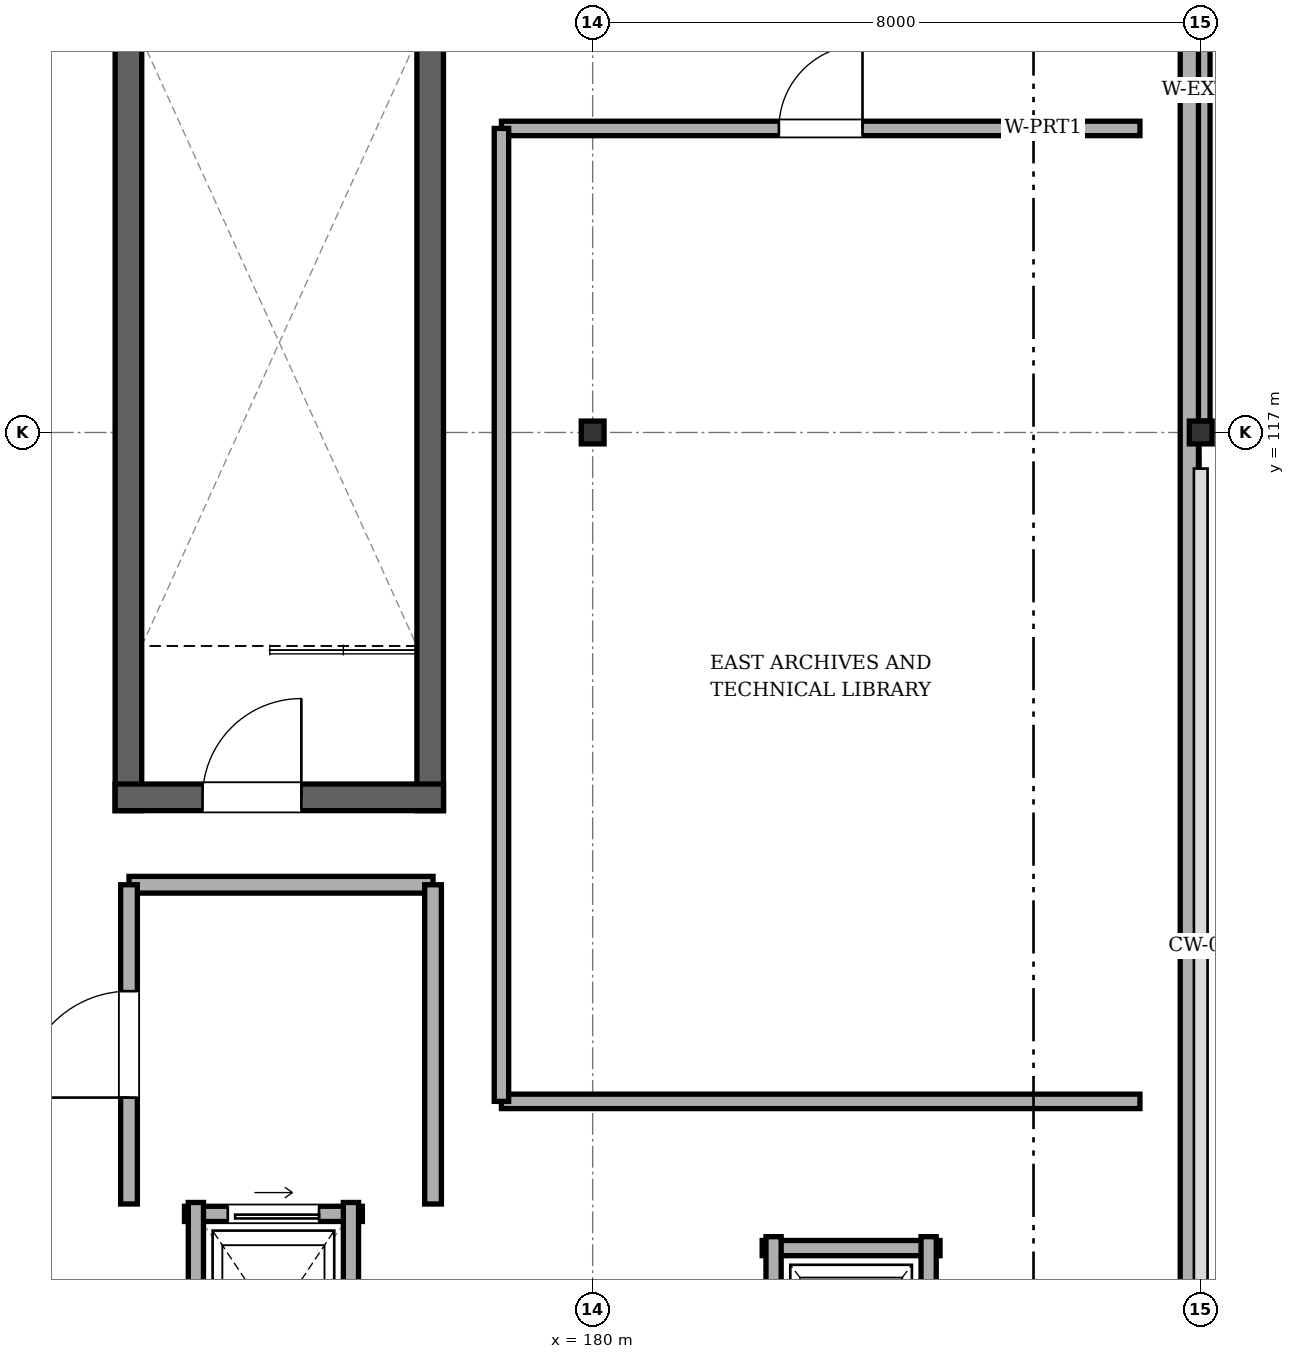
"""IFC4 building model, lengths in metres.
Left out: names, types, materials, properties, quantities, classifications, styles, units other than length and angle.
Written with IfcOpenShell. Run it as: python <this file> out.ifc"""

import sys

from ifc_helpers import new_model, si_unit, direction, frame, frame_2d, origin, origin_2d, place, context, subcontext, project, spatial, rectangle, i_section, extrude, element, fill, save


model = new_model("IFC4")
c1 = context("Model", 3, precision=1e-05, world=origin(), true_north=direction((0.0, 1.0)))
c2 = subcontext(c1, "Body", "Model", "MODEL_VIEW")
j1 = project(units=[si_unit("LENGTHUNIT", "METRE"), si_unit("PLANEANGLEUNIT", "RADIAN")], contexts=[c1])
p1 = place(None, origin())
s1 = spatial("IfcSite", under=j1, at=p1, CompositionType="ELEMENT")
p2 = place(p1, origin())
s2 = spatial("IfcBuilding", under=s1, at=p2, CompositionType="ELEMENT")
p3 = place(p2, frame((0.0, 0.0, 20.8)))
s3 = spatial("IfcBuildingStorey", under=s2, at=p3, CompositionType="ELEMENT", Elevation=20.8)
for number, where, z_axis, x_axis in (
    (1, (180.0, 117.0, 0.0), (0.0, 0.0, 1.0), (1.0, 0.0, 0.0)),
    (2, (188.0, 117.0, 0.0), (0.0, 0.0, 1.0), (1.0, 0.0, 0.0)),
):
    element("IfcColumn", number, at=place(p3, frame(where, z_axis=z_axis, x_axis=x_axis)), inside=s3, PredefinedType="COLUMN", context=c2, shape_type="SweptSolid", body=[
        extrude(i_section(OverallWidth=0.3, OverallDepth=0.3, WebThickness=0.01, FlangeThickness=0.015, FilletRadius=0.018, at=origin_2d()), origin(), (0.0, 0.0, 1.0), 2.85),
    ])
p4 = place(p3, frame((188.0, 125.85, 0.0), z_axis=(0.0, 0.0, 1.0), x_axis=(0.0, -1.0, 0.0)))
e3 = element("IfcWall", 3, at=p4, inside=s3, PredefinedType="SOLIDWALL", context=c2, shape_type="SweptSolid", body=[
    extrude(rectangle(XDim=8.7, YDim=0.245, at=frame_2d((4.35, 0.0))), origin(), (0.0, 0.0, 1.0), 2.18),
])
p5 = place(p3, frame((187.85, 76.65, 2.85), z_axis=(0.0, 0.0, 1.0), x_axis=(0.0, 1.0, 0.0)))
e4 = element("IfcWall", 4, at=p5, inside=s3, PredefinedType="PARAPET", context=c2, shape_type="SweptSolid", body=[
    extrude(rectangle(XDim=49.2, YDim=0.24, at=frame_2d((24.6, 0.0))), origin(), (0.0, 0.0, 1.0), 0.34),
])
for number, where, z_axis, x_axis in (
    (5, (177.863, 112.025, 0.0), (0.0, 0.0, 1.0), (0.0, 1.0, 0.0)),
    (6, (173.893, 122.522, 0.0), (0.0, 0.0, 1.0), (0.0, -1.0, 0.0)),
):
    element("IfcWall", number, at=place(p3, frame(where, z_axis=z_axis, x_axis=x_axis)), inside=s3, PredefinedType="SHEAR", context=c2, shape_type="SweptSolid", body=[
        extrude(rectangle(XDim=10.498, YDim=0.35, at=frame_2d((5.249, 0.0))), origin(), (0.0, 0.0, 1.0), 2.645),
    ])
p6 = place(p3, frame((173.718, 112.2, 0.0), z_axis=(0.0, 0.0, 1.0), x_axis=(1.0, 0.0, 0.0)))
e7 = element("IfcWall", 7, at=p6, inside=s3, PredefinedType="SHEAR", context=c2, shape_type="SweptSolid", body=[
    extrude(rectangle(XDim=4.32, YDim=0.35, at=frame_2d((2.16, 0.0))), origin(), (0.0, 0.0, 1.0), 2.645),
])
p7 = place(p6, frame((1.15, 0.0, 0.0)))
e8 = element("IfcOpeningElement", 8, at=p7, cuts=e7, PredefinedType="OPENING", context=c2, shape_type="SweptSolid", body=[
    extrude(rectangle(XDim=1.3, YDim=2.1, at=frame_2d((0.65, 1.05))), frame((0.0, 0.185, 0.0), z_axis=(0.0, -1.0, 0.0), x_axis=(1.0, 0.0, 0.0)), (0.0, 0.0, 1.0), 0.37),
])
p8 = place(p3, frame((176.97, 106.72, 0.0), z_axis=(0.0, 0.0, 1.0), x_axis=(-1.0, 0.0, 0.0)))
e9 = element("IfcWall", 9, at=p8, inside=s3, PredefinedType="SOLIDWALL", context=c2, shape_type="SweptSolid", body=[
    extrude(rectangle(XDim=2.34, YDim=0.2, at=frame_2d((1.17, 0.0))), origin(), (0.0, 0.0, 1.0), 2.62),
])
p9 = place(p8, frame((0.57, 0.0, 0.0)))
e10 = element("IfcOpeningElement", 10, at=p9, cuts=e9, PredefinedType="OPENING", context=c2, shape_type="SweptSolid", body=[
    extrude(rectangle(XDim=1.2, YDim=2.15, at=frame_2d((0.6, 1.075))), frame((0.0, 0.11, 0.0), z_axis=(0.0, -1.0, 0.0), x_axis=(1.0, 0.0, 0.0)), (0.0, 0.0, 1.0), 0.22),
])
for number, where, z_axis, x_axis in (
    (11, (174.78, 106.87, 0.0), (0.0, 0.0, 1.0), (0.0, -1.0, 0.0)),
    (12, (176.82, 103.73, 0.0), (0.0, 0.0, 1.0), (0.0, 1.0, 0.0)),
):
    element("IfcWall", number, at=place(p3, frame(where, z_axis=z_axis, x_axis=x_axis)), inside=s3, PredefinedType="SOLIDWALL", context=c2, shape_type="SweptSolid", body=[
        extrude(rectangle(XDim=3.14, YDim=0.2, at=frame_2d((1.57, 0.0))), origin(), (0.0, 0.0, 1.0), 2.23),
    ])
p10 = place(p3, frame((184.57, 106.27, 0.0), z_axis=(0.0, 0.0, 1.0), x_axis=(-1.0, 0.0, 0.0)))
e13 = element("IfcWall", 13, at=p10, inside=s3, PredefinedType="SOLIDWALL", context=c2, shape_type="SweptSolid", body=[
    extrude(rectangle(XDim=2.34, YDim=0.2, at=frame_2d((1.17, 0.0))), origin(), (0.0, 0.0, 1.0), 2.62),
])
for number, where, z_axis, x_axis in (
    (14, (182.38, 106.42, 0.0), (0.0, 0.0, 1.0), (0.0, -1.0, 0.0)),
    (15, (184.42, 103.58, 0.0), (0.0, 0.0, 1.0), (0.0, 1.0, 0.0)),
):
    element("IfcWall", number, at=place(p3, frame(where, z_axis=z_axis, x_axis=x_axis)), inside=s3, PredefinedType="SOLIDWALL", context=c2, shape_type="SweptSolid", body=[
        extrude(rectangle(XDim=2.84, YDim=0.2, at=frame_2d((1.42, 0.0))), origin(), (0.0, 0.0, 1.0), 2.23),
    ])
p11 = place(p3, frame((187.2, 108.2, 0.0), z_axis=(0.0, 0.0, 1.0), x_axis=(-1.0, 0.0, 0.0)))
e16 = element("IfcWall", 16, at=p11, inside=s3, PredefinedType="PARTITIONING", context=c2, shape_type="SweptSolid", body=[
    extrude(rectangle(XDim=8.4, YDim=0.19, at=frame_2d((4.2, 0.0))), origin(), (0.0, 0.0, 1.0), 2.18),
])
p12 = place(p3, frame((178.8, 121.0, 0.0), z_axis=(0.0, 0.0, 1.0), x_axis=(1.0, 0.0, 0.0)))
e17 = element("IfcWall", 17, at=p12, inside=s3, PredefinedType="PARTITIONING", context=c2, shape_type="SweptSolid", body=[
    extrude(rectangle(XDim=8.4, YDim=0.19, at=frame_2d((4.2, 0.0))), origin(), (0.0, 0.0, 1.0), 2.23),
])
p13 = place(p12, frame((3.65, 0.0, 0.0)))
e18 = element("IfcOpeningElement", 18, at=p13, cuts=e17, PredefinedType="OPENING", context=c2, shape_type="SweptSolid", body=[
    extrude(rectangle(XDim=1.1, YDim=2.1, at=frame_2d((0.55, 1.05))), frame((0.0, 0.105, 0.0), z_axis=(0.0, -1.0, 0.0), x_axis=(1.0, 0.0, 0.0)), (0.0, 0.0, 1.0), 0.21),
])
p14 = place(p3, frame((178.8, 108.2, 0.0), z_axis=(0.0, 0.0, 1.0), x_axis=(0.0, 1.0, 0.0)))
e19 = element("IfcWall", 19, at=p14, inside=s3, PredefinedType="PARTITIONING", context=c2, shape_type="SweptSolid", body=[
    extrude(rectangle(XDim=12.8, YDim=0.19, at=frame_2d((6.4, 0.0))), origin(), (0.0, 0.0, 1.0), 2.23),
])
p15 = place(p3, frame((173.9, 111.05, 0.0), z_axis=(0.0, 0.0, 1.0), x_axis=(1.0, 0.0, 0.0)))
e20 = element("IfcWall", 20, at=p15, inside=s3, PredefinedType="SOLIDWALL", context=c2, shape_type="SweptSolid", body=[
    extrude(rectangle(XDim=4.0, YDim=0.22, at=frame_2d((2.0, 0.0))), origin(), (0.0, 0.0, 1.0), 2.62),
])
p16 = place(p3, frame((173.9, 106.85, 0.0), z_axis=(0.0, 0.0, 1.0), x_axis=(0.0, 1.0, 0.0)))
e21 = element("IfcWall", 21, at=p16, inside=s3, PredefinedType="SOLIDWALL", context=c2, shape_type="SweptSolid", body=[
    extrude(rectangle(XDim=4.2, YDim=0.22, at=frame_2d((2.1, 0.0))), origin(), (0.0, 0.0, 1.0), 2.62),
])
p17 = place(p16, frame((1.4, 0.0, 0.0)))
e22 = element("IfcOpeningElement", 22, at=p17, cuts=e21, PredefinedType="OPENING", context=c2, shape_type="SweptSolid", body=[
    extrude(rectangle(XDim=1.4, YDim=2.1, at=frame_2d((0.7, 1.05))), frame((0.0, 0.12, 0.0), z_axis=(0.0, -1.0, 0.0), x_axis=(1.0, 0.0, 0.0)), (0.0, 0.0, 1.0), 0.24),
])
p18 = place(p3, frame((177.9, 111.05, 0.0), z_axis=(0.0, 0.0, 1.0), x_axis=(0.0, -1.0, 0.0)))
e23 = element("IfcWall", 23, at=p18, inside=s3, PredefinedType="SOLIDWALL", context=c2, shape_type="SweptSolid", body=[
    extrude(rectangle(XDim=4.2, YDim=0.22, at=frame_2d((2.1, 0.0))), origin(), (0.0, 0.0, 1.0), 2.62),
])
p19 = place(p7, origin())
e24 = element("IfcDoor", 24, at=p19, inside=s3, OperationType="SINGLE_SWING_RIGHT", PredefinedType="DOOR", context=c2, shape_type="SweptSolid", body=[
    extrude(rectangle(XDim=1.3, YDim=2.1, at=frame_2d((0.65, 1.05))), frame((0.0, 0.025, 0.0), z_axis=(0.0, -1.0, 0.0), x_axis=(1.0, 0.0, 0.0)), (0.0, 0.0, 1.0), 0.05),
])
fill(e8, e24)
p20 = place(p9, origin())
e25 = element("IfcDoor", 25, at=p20, inside=s3, OperationType="SLIDING_TO_LEFT", PredefinedType="DOOR", context=c2, shape_type="SweptSolid", body=[
    extrude(rectangle(XDim=1.2, YDim=2.15, at=frame_2d((0.6, 1.075))), frame((0.0, 0.025, 0.0), z_axis=(0.0, -1.0, 0.0), x_axis=(1.0, 0.0, 0.0)), (0.0, 0.0, 1.0), 0.05),
])
fill(e10, e25)
p21 = place(p13, origin())
e26 = element("IfcDoor", 26, at=p21, inside=s3, OperationType="SINGLE_SWING_RIGHT", PredefinedType="DOOR", context=c2, shape_type="SweptSolid", body=[
    extrude(rectangle(XDim=1.1, YDim=2.1, at=frame_2d((0.55, 1.05))), frame((0.0, 0.025, 0.0), z_axis=(0.0, -1.0, 0.0), x_axis=(1.0, 0.0, 0.0)), (0.0, 0.0, 1.0), 0.05),
])
fill(e18, e26)
p22 = place(p17, origin())
e27 = element("IfcDoor", 27, at=p22, inside=s3, OperationType="SINGLE_SWING_LEFT", PredefinedType="DOOR", context=c2, shape_type="SweptSolid", body=[
    extrude(rectangle(XDim=1.4, YDim=2.1, at=frame_2d((0.7, 1.05))), frame((0.0, 0.025, 0.0), z_axis=(0.0, -1.0, 0.0), x_axis=(1.0, 0.0, 0.0)), (0.0, 0.0, 1.0), 0.05),
])
fill(e22, e27)
save(model, sys.argv[1])
